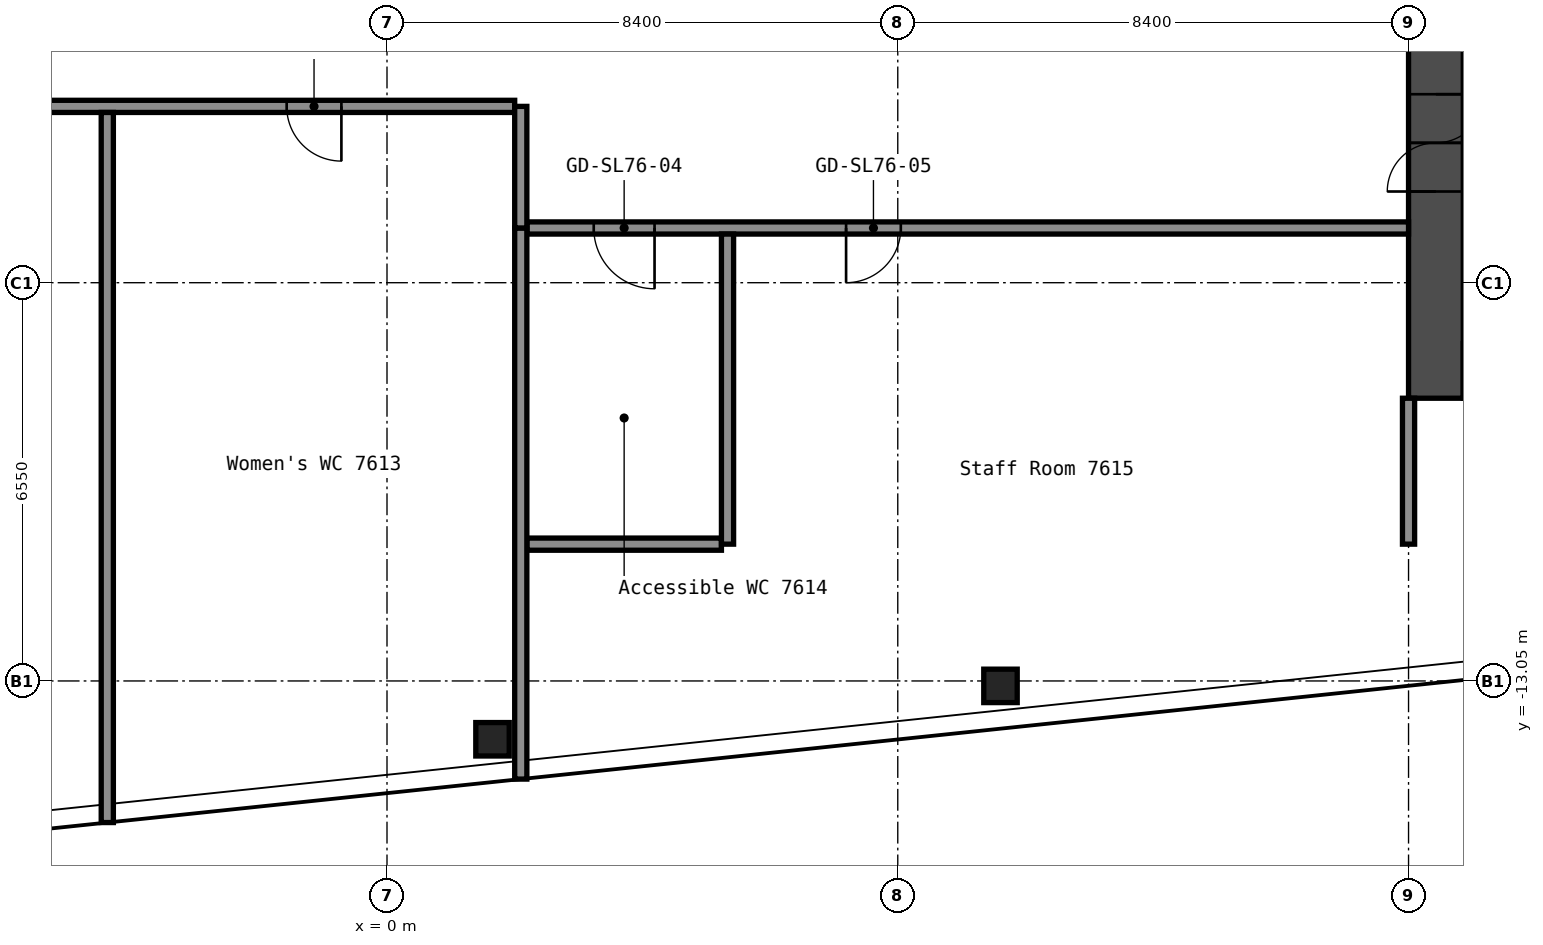
"""IFC4 building model, lengths in metres.
Left out: names, types, materials, properties, quantities, classifications, styles, units other than length and angle.
Written with IfcOpenShell. Run it as: python <this file> out.ifc"""

import sys

from ifc_helpers import new_model, si_unit, direction, frame, frame_2d, origin, origin_2d, place, context, subcontext, project, spatial, rectangle, hollow_rectangle, extrude, element, fill, save


model = new_model("IFC4")
c1 = context("Model", 3, precision=1e-05, world=origin(), true_north=direction((0.0, 1.0)))
c2 = subcontext(c1, "Body", "Model", "MODEL_VIEW")
j1 = project(units=[si_unit("LENGTHUNIT", "METRE"), si_unit("PLANEANGLEUNIT", "RADIAN")], contexts=[c1])
p1 = place(None, origin())
s1 = spatial("IfcSite", under=j1, at=p1, CompositionType="ELEMENT")
p2 = place(p1, origin())
s2 = spatial("IfcBuilding", under=s1, at=p2, CompositionType="ELEMENT")
p3 = place(p2, frame((0.0, 0.0, 270.6)))
s3 = spatial("IfcBuildingStorey", under=s2, at=p3, CompositionType="ELEMENT", Elevation=270.6)
for number, where, z_axis, x_axis in (
    (1, (1.735, -14.009, 0.0), (0.0, 0.0, 1.0), (1.0, 0.0, 0.0)),
    (2, (10.089, -13.131, 0.0), (0.0, 0.0, 1.0), (1.0, 0.0, 0.0)),
):
    element("IfcColumn", number, at=place(p3, frame(where, z_axis=z_axis, x_axis=x_axis)), inside=s3, PredefinedType="COLUMN", context=c2, shape_type="SweptSolid", body=[
        extrude(hollow_rectangle(XDim=0.55, YDim=0.55, WallThickness=0.022, InnerFilletRadius=0.033, OuterFilletRadius=0.055, at=origin_2d()), origin(), (0.0, 0.0, 1.0), 5.55),
    ])
p4 = place(p3, frame((17.25, -8.4, 0.0), z_axis=(0.0, 0.0, 1.0), x_axis=(0.0, 1.0, 0.0)))
e3 = element("IfcWall", 3, at=p4, inside=s3, PredefinedType="SHEAR", context=c2, shape_type="SweptSolid", body=[
    extrude(rectangle(XDim=16.8, YDim=0.9, at=frame_2d((8.4, 0.0))), origin(), (0.0, 0.0, 1.0), 5.55),
])
p5 = place(p4, frame((3.4, 0.0, 0.0)))
e4 = element("IfcOpeningElement", 4, at=p5, cuts=e3, PredefinedType="OPENING", context=c2, shape_type="SweptSolid", body=[
    extrude(rectangle(XDim=1.6, YDim=2.1, at=frame_2d((0.8, 1.05))), frame((0.0, 0.46, 0.0), z_axis=(0.0, -1.0, 0.0), x_axis=(1.0, 0.0, 0.0)), (0.0, 0.0, 1.0), 0.92),
])
p6 = place(p4, frame((9.6, 0.0, 0.0)))
e5 = element("IfcOpeningElement", 5, at=p6, cuts=e3, PredefinedType="OPENING", context=c2, shape_type="SweptSolid", body=[
    extrude(rectangle(XDim=1.6, YDim=2.1, at=frame_2d((0.8, 1.05))), frame((0.0, 0.46, 0.0), z_axis=(0.0, -1.0, 0.0), x_axis=(1.0, 0.0, 0.0)), (0.0, 0.0, 1.0), 0.92),
])
p7 = place(p4, frame((11.8, 0.0, 0.0)))
e6 = element("IfcOpeningElement", 6, at=p7, cuts=e3, PredefinedType="OPENING", context=c2, shape_type="SweptSolid", body=[
    extrude(rectangle(XDim=1.6, YDim=2.1, at=frame_2d((0.8, 1.05))), frame((0.0, 0.46, 0.0), z_axis=(0.0, -1.0, 0.0), x_axis=(1.0, 0.0, 0.0)), (0.0, 0.0, 1.0), 0.92),
])
p8 = place(p3, frame((2.3, -10.8, 0.0), z_axis=(0.0, 0.0, 1.0), x_axis=(1.0, 0.0, 0.0)))
e7 = element("IfcWall", 7, at=p8, inside=s3, PredefinedType="PARTITIONING", context=c2, shape_type="SweptSolid", body=[
    extrude(rectangle(XDim=3.2, YDim=0.2, at=frame_2d((1.6, 0.0))), origin(), (0.0, 0.0, 1.0), 5.55),
])
p9 = place(p3, frame((2.3, -5.6, 0.0), z_axis=(0.0, 0.0, 1.0), x_axis=(1.0, 0.0, 0.0)))
e8 = element("IfcWall", 8, at=p9, inside=s3, PredefinedType="PARTITIONING", context=c2, shape_type="SweptSolid", body=[
    extrude(rectangle(XDim=14.5, YDim=0.2, at=frame_2d((7.25, 0.0))), origin(), (0.0, 0.0, 1.0), 5.55),
])
p10 = place(p9, frame((1.1, 0.0, 0.0)))
e9 = element("IfcOpeningElement", 9, at=p10, cuts=e8, PredefinedType="OPENING", context=c2, shape_type="SweptSolid", body=[
    extrude(rectangle(XDim=1.0, YDim=2.1, at=frame_2d((0.5, 1.05))), frame((0.0, 0.11, 0.0), z_axis=(0.0, -1.0, 0.0), x_axis=(1.0, 0.0, 0.0)), (0.0, 0.0, 1.0), 0.22),
])
p11 = place(p9, frame((5.25, 0.0, 0.0)))
e10 = element("IfcOpeningElement", 10, at=p11, cuts=e8, PredefinedType="OPENING", context=c2, shape_type="SweptSolid", body=[
    extrude(rectangle(XDim=0.9, YDim=2.1, at=frame_2d((0.45, 1.05))), frame((0.0, 0.11, 0.0), z_axis=(0.0, -1.0, 0.0), x_axis=(1.0, 0.0, 0.0)), (0.0, 0.0, 1.0), 0.22),
])
p12 = place(p3, frame((-13.1, -3.6, 0.0), z_axis=(0.0, 0.0, 1.0), x_axis=(1.0, 0.0, 0.0)))
e11 = element("IfcWall", 11, at=p12, inside=s3, PredefinedType="PARTITIONING", context=c2, shape_type="SweptSolid", body=[
    extrude(rectangle(XDim=15.2, YDim=0.2, at=frame_2d((7.6, 0.0))), origin(), (0.0, 0.0, 1.0), 5.55),
])
p13 = place(p12, frame((0.45, 0.0, 0.0)))
e12 = element("IfcOpeningElement", 12, at=p13, cuts=e11, PredefinedType="OPENING", context=c2, shape_type="SweptSolid", body=[
    extrude(rectangle(XDim=0.9, YDim=2.1, at=frame_2d((0.45, 1.05))), frame((0.0, 0.11, 0.0), z_axis=(0.0, -1.0, 0.0), x_axis=(1.0, 0.0, 0.0)), (0.0, 0.0, 1.0), 0.22),
])
p14 = place(p12, frame((4.85, 0.0, 0.0)))
e13 = element("IfcOpeningElement", 13, at=p14, cuts=e11, PredefinedType="OPENING", context=c2, shape_type="SweptSolid", body=[
    extrude(rectangle(XDim=0.9, YDim=2.1, at=frame_2d((0.45, 1.05))), frame((0.0, 0.11, 0.0), z_axis=(0.0, -1.0, 0.0), x_axis=(1.0, 0.0, 0.0)), (0.0, 0.0, 1.0), 0.22),
])
p15 = place(p12, frame((11.45, 0.0, 0.0)))
e14 = element("IfcOpeningElement", 14, at=p15, cuts=e11, PredefinedType="OPENING", context=c2, shape_type="SweptSolid", body=[
    extrude(rectangle(XDim=0.9, YDim=2.1, at=frame_2d((0.45, 1.05))), frame((0.0, 0.11, 0.0), z_axis=(0.0, -1.0, 0.0), x_axis=(1.0, 0.0, 0.0)), (0.0, 0.0, 1.0), 0.22),
])
p16 = place(p3, frame((-4.6, -15.379, 0.0), z_axis=(0.0, 0.0, 1.0), x_axis=(0.0, 1.0, 0.0)))
e15 = element("IfcWall", 15, at=p16, inside=s3, PredefinedType="PARTITIONING", context=c2, shape_type="SweptSolid", body=[
    extrude(rectangle(XDim=11.679, YDim=0.2, at=frame_2d((5.839, 0.0))), origin(), (0.0, 0.0, 1.0), 5.55),
])
p17 = place(p3, frame((2.2, -14.664, 0.0), z_axis=(0.0, 0.0, 1.0), x_axis=(0.0, 1.0, 0.0)))
e16 = element("IfcWall", 16, at=p17, inside=s3, PredefinedType="PARTITIONING", context=c2, shape_type="SweptSolid", body=[
    extrude(rectangle(XDim=9.064, YDim=0.2, at=frame_2d((4.532, 0.0))), origin(), (0.0, 0.0, 1.0), 5.55),
])
p18 = place(p3, frame((2.2, -5.6, 0.0), z_axis=(0.0, 0.0, 1.0), x_axis=(0.0, 1.0, 0.0)))
e17 = element("IfcWall", 17, at=p18, inside=s3, PredefinedType="PARTITIONING", context=c2, shape_type="SweptSolid", body=[
    extrude(rectangle(XDim=2.0, YDim=0.2, at=frame_2d((1.0, 0.0))), origin(), (0.0, 0.0, 1.0), 5.55),
])
p19 = place(p3, frame((5.6, -10.8, 0.0), z_axis=(0.0, 0.0, 1.0), x_axis=(0.0, 1.0, 0.0)))
e18 = element("IfcWall", 18, at=p19, inside=s3, PredefinedType="PARTITIONING", context=c2, shape_type="SweptSolid", body=[
    extrude(rectangle(XDim=5.1, YDim=0.2, at=frame_2d((2.55, 0.0))), origin(), (0.0, 0.0, 1.0), 5.55),
])
p20 = place(p3, frame((16.8, -10.8, 0.0), z_axis=(0.0, 0.0, 1.0), x_axis=(0.0, 1.0, 0.0)))
e19 = element("IfcWall", 19, at=p20, inside=s3, PredefinedType="PARTITIONING", context=c2, shape_type="SweptSolid", body=[
    extrude(rectangle(XDim=2.4, YDim=0.2, at=frame_2d((1.2, 0.0))), origin(), (0.0, 0.0, 1.0), 5.55),
])
p21 = place(p5, origin())
e20 = element("IfcDoor", 20, at=p21, inside=s3, OperationType="DOUBLE_DOOR_SINGLE_SWING", PredefinedType="DOOR", context=c2, shape_type="SweptSolid", body=[
    extrude(rectangle(XDim=1.6, YDim=2.1, at=frame_2d((0.8, 1.05))), frame((0.0, 0.025, 0.0), z_axis=(0.0, -1.0, 0.0), x_axis=(1.0, 0.0, 0.0)), (0.0, 0.0, 1.0), 0.05),
])
fill(e4, e20)
p22 = place(p10, origin())
e21 = element("IfcDoor", 21, at=p22, inside=s3, OperationType="SINGLE_SWING_RIGHT", PredefinedType="DOOR", context=c2, shape_type="SweptSolid", body=[
    extrude(rectangle(XDim=1.0, YDim=2.1, at=frame_2d((0.5, 1.05))), frame((0.0, 0.025, 0.0), z_axis=(0.0, -1.0, 0.0), x_axis=(1.0, 0.0, 0.0)), (0.0, 0.0, 1.0), 0.05),
])
fill(e9, e21)
p23 = place(p11, origin())
e22 = element("IfcDoor", 22, at=p23, inside=s3, OperationType="SINGLE_SWING_LEFT", PredefinedType="DOOR", context=c2, shape_type="SweptSolid", body=[
    extrude(rectangle(XDim=0.9, YDim=2.1, at=frame_2d((0.45, 1.05))), frame((0.0, 0.025, 0.0), z_axis=(0.0, -1.0, 0.0), x_axis=(1.0, 0.0, 0.0)), (0.0, 0.0, 1.0), 0.05),
])
fill(e10, e22)
p24 = place(p15, origin())
e23 = element("IfcDoor", 23, at=p24, inside=s3, OperationType="SINGLE_SWING_RIGHT", PredefinedType="DOOR", context=c2, shape_type="SweptSolid", body=[
    extrude(rectangle(XDim=0.9, YDim=2.1, at=frame_2d((0.45, 1.05))), frame((0.0, 0.025, 0.0), z_axis=(0.0, -1.0, 0.0), x_axis=(1.0, 0.0, 0.0)), (0.0, 0.0, 1.0), 0.05),
])
fill(e14, e23)
save(model, sys.argv[1])
